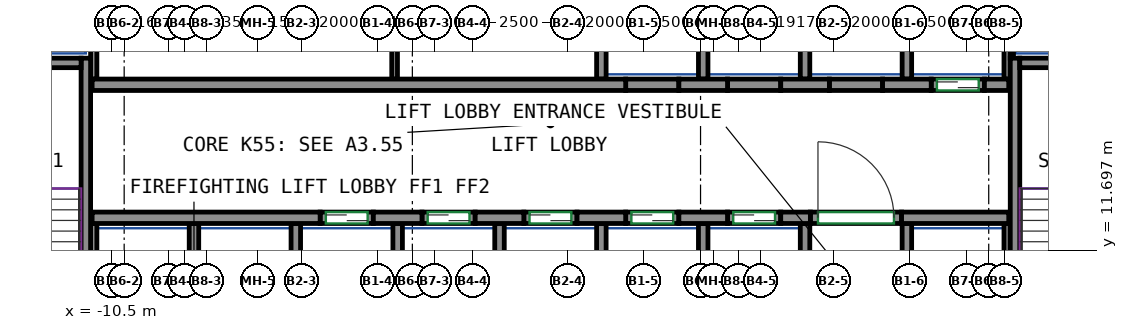
"""IFC4 building model, lengths in metres.
Left out: names, types, materials, properties, quantities, classifications, styles, units other than length and angle.
Written with IfcOpenShell. Run it as: python <this file> out.ifc"""

import sys

from ifc_helpers import new_model, si_unit, direction, frame, frame_2d, origin, place, context, subcontext, project, spatial, rectangle, extrude, source, transform, mapped, element, fill, save


model = new_model("IFC4")
c1 = context("Model", 3, precision=1e-05, world=origin(), true_north=direction((0.0, 1.0)))
c2 = subcontext(c1, "Body", "Model", "MODEL_VIEW")
j1 = project(units=[si_unit("LENGTHUNIT", "METRE"), si_unit("PLANEANGLEUNIT", "RADIAN")], contexts=[c1])
p1 = place(None, origin())
s1 = spatial("IfcSite", under=j1, at=p1, CompositionType="ELEMENT")
p2 = place(p1, origin())
s2 = spatial("IfcBuilding", under=s1, at=p2, CompositionType="ELEMENT")
p3 = place(p2, frame((0.0, 0.0, 220.3)))
s3 = spatial("IfcBuildingStorey", under=s2, at=p3, CompositionType="ELEMENT", Elevation=220.3)
m1 = source(origin(), c2, "Body", "SweptSolid", [
    extrude(rectangle(XDim=7.75, YDim=0.25, at=frame_2d((3.875, 0.0))), origin(), (0.0, 0.0, 1.0), 3.0),
])
p4 = place(p3, frame((-11.175, 9.0, 0.0), z_axis=(0.0, 0.0, 1.0), x_axis=(0.0, 1.0, 0.0)))
e1 = element("IfcWall", 1, at=p4, inside=s3, PredefinedType="SHEAR", context=c2, shape_type="MappedRepresentation", body=[
    mapped(m1, transform((0.0, 0.0, 0.0))),
])
m2 = source(origin(), c2, "Body", "SweptSolid", [
    extrude(rectangle(XDim=3.7, YDim=0.25, at=frame_2d((1.85, 0.0))), origin(), (0.0, 0.0, 1.0), 3.0),
])
p5 = place(p3, frame((-15.0, 16.625, 0.0), z_axis=(0.0, 0.0, 1.0), x_axis=(1.0, 0.0, 0.0)))
e2 = element("IfcWall", 2, at=p5, inside=s3, PredefinedType="SHEAR", context=c2, shape_type="MappedRepresentation", body=[
    mapped(m2, transform((0.0, 0.0, 0.0))),
])
p6 = place(p3, frame((13.275, 9.0, 0.0), z_axis=(0.0, 0.0, 1.0), x_axis=(0.0, 1.0, 0.0)))
e3 = element("IfcWall", 3, at=p6, inside=s3, PredefinedType="SHEAR", context=c2, shape_type="MappedRepresentation", body=[
    mapped(m1, transform((0.0, 0.0, 0.0))),
])
m3 = source(origin(), c2, "Body", "SweptSolid", [
    extrude(rectangle(XDim=3.7, YDim=0.25, at=frame_2d((1.85, 0.0))), origin(), (0.0, 0.0, 1.0), 3.0),
])
p7 = place(p3, frame((13.4, 16.625, 0.0), z_axis=(0.0, 0.0, 1.0), x_axis=(1.0, 0.0, 0.0)))
e4 = element("IfcWall", 4, at=p7, inside=s3, PredefinedType="SHEAR", context=c2, shape_type="MappedRepresentation", body=[
    mapped(m3, transform((0.0, 0.0, 0.0))),
])
m4 = source(origin(), c2, "Body", "SweptSolid", [
    extrude(rectangle(XDim=6.0, YDim=0.3, at=frame_2d((3.0, 0.0))), origin(), (0.0, 0.0, 1.0), 3.0),
])
p8 = place(p3, frame((-11.01, 12.55, 0.0), z_axis=(0.0, 0.0, 1.0), x_axis=(1.0, 0.0, 0.0)))
e5 = element("IfcWall", 5, at=p8, inside=s3, PredefinedType="SHEAR", context=c2, shape_type="MappedRepresentation", body=[
    mapped(m4, transform((0.0, 0.0, 0.0))),
])
m5 = source(origin(), c2, "Body", "SweptSolid", [
    extrude(rectangle(XDim=1.28, YDim=0.3, at=frame_2d((0.64, 0.0))), origin(), (0.0, 0.0, 1.0), 3.0),
])
for number, where, z_axis, x_axis in (
    (6, (-3.61, 12.55, 0.0), (0.0, 0.0, 1.0), (1.0, 0.0, 0.0)),
    (7, (-0.93, 12.55, 0.0), (0.0, 0.0, 1.0), (1.0, 0.0, 0.0)),
    (8, (1.75, 12.55, 0.0), (0.0, 0.0, 1.0), (1.0, 0.0, 0.0)),
    (9, (4.43, 12.55, 0.0), (0.0, 0.0, 1.0), (1.0, 0.0, 0.0)),
):
    element("IfcWall", number, at=place(p3, frame(where, z_axis=z_axis, x_axis=x_axis)), inside=s3, PredefinedType="SHEAR", context=c2, shape_type="MappedRepresentation", body=[
        mapped(m5, transform((0.0, 0.0, 0.0))),
    ])
m6 = source(origin(), c2, "Body", "SweptSolid", [
    extrude(rectangle(XDim=0.78, YDim=0.3, at=frame_2d((0.39, 0.0))), origin(), (0.0, 0.0, 1.0), 3.0),
])
p9 = place(p3, frame((7.11, 12.55, 0.0), z_axis=(0.0, 0.0, 1.0), x_axis=(1.0, 0.0, 0.0)))
e10 = element("IfcWall", 10, at=p9, inside=s3, PredefinedType="SHEAR", context=c2, shape_type="MappedRepresentation", body=[
    mapped(m6, transform((0.0, 0.0, 0.0))),
])
m7 = source(origin(), c2, "Body", "SweptSolid", [
    extrude(rectangle(XDim=2.82, YDim=0.3, at=frame_2d((1.41, 0.0))), origin(), (0.0, 0.0, 1.0), 3.0),
])
p10 = place(p3, frame((10.29, 12.55, 0.0), z_axis=(0.0, 0.0, 1.0), x_axis=(1.0, 0.0, 0.0)))
e11 = element("IfcWall", 11, at=p10, inside=s3, PredefinedType="SHEAR", context=c2, shape_type="MappedRepresentation", body=[
    mapped(m7, transform((0.0, 0.0, 0.0))),
])
m8 = source(origin(), c2, "Body", "SweptSolid", [
    extrude(rectangle(XDim=14.04, YDim=0.3, at=frame_2d((7.02, 0.0))), origin(), (0.0, 0.0, 1.0), 3.0),
])
p11 = place(p3, frame((-11.01, 16.05, 0.0), z_axis=(0.0, 0.0, 1.0), x_axis=(1.0, 0.0, 0.0)))
e12 = element("IfcWall", 12, at=p11, inside=s3, PredefinedType="SHEAR", context=c2, shape_type="MappedRepresentation", body=[
    mapped(m8, transform((0.0, 0.0, 0.0))),
])
p12 = place(p3, frame((4.43, 16.05, 0.0), z_axis=(0.0, 0.0, 1.0), x_axis=(1.0, 0.0, 0.0)))
e13 = element("IfcWall", 13, at=p12, inside=s3, PredefinedType="SHEAR", context=c2, shape_type="MappedRepresentation", body=[
    mapped(m5, transform((0.0, 0.0, 0.0))),
])
m9 = source(origin(), c2, "Body", "SweptSolid", [
    extrude(rectangle(XDim=1.28, YDim=0.3, at=frame_2d((0.64, 0.0))), origin(), (0.0, 0.0, 1.0), 3.0),
])
p13 = place(p3, frame((7.11, 16.05, 0.0), z_axis=(0.0, 0.0, 1.0), x_axis=(1.0, 0.0, 0.0)))
e14 = element("IfcWall", 14, at=p13, inside=s3, PredefinedType="SHEAR", context=c2, shape_type="MappedRepresentation", body=[
    mapped(m9, transform((0.0, 0.0, 0.0))),
])
p14 = place(p3, frame((9.79, 16.05, 0.0), z_axis=(0.0, 0.0, 1.0), x_axis=(1.0, 0.0, 0.0)))
e15 = element("IfcWall", 15, at=p14, inside=s3, PredefinedType="SHEAR", context=c2, shape_type="MappedRepresentation", body=[
    mapped(m5, transform((0.0, 0.0, 0.0))),
])
m10 = source(origin(), c2, "Body", "SweptSolid", [
    extrude(rectangle(XDim=0.64, YDim=0.3, at=frame_2d((0.32, 0.0))), origin(), (0.0, 0.0, 1.0), 3.0),
])
p15 = place(p3, frame((12.47, 16.05, 0.0), z_axis=(0.0, 0.0, 1.0), x_axis=(1.0, 0.0, 0.0)))
e16 = element("IfcWall", 16, at=p15, inside=s3, PredefinedType="SHEAR", context=c2, shape_type="MappedRepresentation", body=[
    mapped(m10, transform((0.0, 0.0, 0.0))),
])
m11 = source(origin(), c2, "Body", "SweptSolid", [
    extrude(rectangle(XDim=1.4, YDim=0.3, at=frame_2d((0.7, 0.0))), origin(), (0.0, 0.0, 1.0), 3.0),
])
p16 = place(p3, frame((-5.01, 12.55, 0.0), z_axis=(0.0, 0.0, 1.0), x_axis=(1.0, 0.0, 0.0)))
e17 = element("IfcWall", 17, at=p16, inside=s3, PredefinedType="PARTITIONING", context=c2, shape_type="MappedRepresentation", body=[
    mapped(m11, transform((0.0, 0.0, 0.0))),
])
p17 = place(p16, frame((0.15, 0.0, 0.0)))
e18 = element("IfcOpeningElement", 18, at=p17, cuts=e17, PredefinedType="OPENING", context=c2, shape_type="SweptSolid", body=[
    extrude(rectangle(XDim=1.1, YDim=2.1, at=frame_2d((0.55, 1.05))), frame((0.0, 0.16, 0.0), z_axis=(0.0, -1.0, 0.0), x_axis=(1.0, 0.0, 0.0)), (0.0, 0.0, 1.0), 0.32),
])
m12 = source(origin(), c2, "Body", "SweptSolid", [
    extrude(rectangle(XDim=1.4, YDim=0.3, at=frame_2d((0.7, 0.0))), origin(), (0.0, 0.0, 1.0), 3.0),
])
p18 = place(p3, frame((-2.33, 12.55, 0.0), z_axis=(0.0, 0.0, 1.0), x_axis=(1.0, 0.0, 0.0)))
e19 = element("IfcWall", 19, at=p18, inside=s3, PredefinedType="PARTITIONING", context=c2, shape_type="MappedRepresentation", body=[
    mapped(m12, transform((0.0, 0.0, 0.0))),
])
p19 = place(p18, frame((0.15, 0.0, 0.0)))
e20 = element("IfcOpeningElement", 20, at=p19, cuts=e19, PredefinedType="OPENING", context=c2, shape_type="SweptSolid", body=[
    extrude(rectangle(XDim=1.1, YDim=2.1, at=frame_2d((0.55, 1.05))), frame((0.0, 0.16, 0.0), z_axis=(0.0, -1.0, 0.0), x_axis=(1.0, 0.0, 0.0)), (0.0, 0.0, 1.0), 0.32),
])
p20 = place(p3, frame((0.35, 12.55, 0.0), z_axis=(0.0, 0.0, 1.0), x_axis=(1.0, 0.0, 0.0)))
e21 = element("IfcWall", 21, at=p20, inside=s3, PredefinedType="PARTITIONING", context=c2, shape_type="MappedRepresentation", body=[
    mapped(m11, transform((0.0, 0.0, 0.0))),
])
p21 = place(p20, frame((0.15, 0.0, 0.0)))
e22 = element("IfcOpeningElement", 22, at=p21, cuts=e21, PredefinedType="OPENING", context=c2, shape_type="SweptSolid", body=[
    extrude(rectangle(XDim=1.1, YDim=2.1, at=frame_2d((0.55, 1.05))), frame((0.0, 0.16, 0.0), z_axis=(0.0, -1.0, 0.0), x_axis=(1.0, 0.0, 0.0)), (0.0, 0.0, 1.0), 0.32),
])
p22 = place(p3, frame((3.03, 12.55, 0.0), z_axis=(0.0, 0.0, 1.0), x_axis=(1.0, 0.0, 0.0)))
e23 = element("IfcWall", 23, at=p22, inside=s3, PredefinedType="PARTITIONING", context=c2, shape_type="MappedRepresentation", body=[
    mapped(m11, transform((0.0, 0.0, 0.0))),
])
p23 = place(p22, frame((0.15, 0.0, 0.0)))
e24 = element("IfcOpeningElement", 24, at=p23, cuts=e23, PredefinedType="OPENING", context=c2, shape_type="SweptSolid", body=[
    extrude(rectangle(XDim=1.1, YDim=2.1, at=frame_2d((0.55, 1.05))), frame((0.0, 0.16, 0.0), z_axis=(0.0, -1.0, 0.0), x_axis=(1.0, 0.0, 0.0)), (0.0, 0.0, 1.0), 0.32),
])
p24 = place(p3, frame((5.71, 12.55, 0.0), z_axis=(0.0, 0.0, 1.0), x_axis=(1.0, 0.0, 0.0)))
e25 = element("IfcWall", 25, at=p24, inside=s3, PredefinedType="PARTITIONING", context=c2, shape_type="MappedRepresentation", body=[
    mapped(m12, transform((0.0, 0.0, 0.0))),
])
p25 = place(p24, frame((0.15, 0.0, 0.0)))
e26 = element("IfcOpeningElement", 26, at=p25, cuts=e25, PredefinedType="OPENING", context=c2, shape_type="SweptSolid", body=[
    extrude(rectangle(XDim=1.1, YDim=2.1, at=frame_2d((0.55, 1.05))), frame((0.0, 0.16, 0.0), z_axis=(0.0, -1.0, 0.0), x_axis=(1.0, 0.0, 0.0)), (0.0, 0.0, 1.0), 0.32),
])
p26 = place(p3, frame((11.07, 16.05, 0.0), z_axis=(0.0, 0.0, 1.0), x_axis=(1.0, 0.0, 0.0)))
e27 = element("IfcWall", 27, at=p26, inside=s3, PredefinedType="PARTITIONING", context=c2, shape_type="MappedRepresentation", body=[
    mapped(m11, transform((0.0, 0.0, 0.0))),
])
p27 = place(p26, frame((0.15, 0.0, 0.0)))
e28 = element("IfcOpeningElement", 28, at=p27, cuts=e27, PredefinedType="OPENING", context=c2, shape_type="SweptSolid", body=[
    extrude(rectangle(XDim=1.1, YDim=2.1, at=frame_2d((0.55, 1.05))), frame((0.0, 0.16, 0.0), z_axis=(0.0, -1.0, 0.0), x_axis=(1.0, 0.0, 0.0)), (0.0, 0.0, 1.0), 0.32),
])
m13 = source(origin(), c2, "Body", "SweptSolid", [
    extrude(rectangle(XDim=2.4, YDim=0.3, at=frame_2d((1.2, 0.0))), origin(), (0.0, 0.0, 1.0), 3.0),
])
p28 = place(p3, frame((7.89, 12.55, 0.0), z_axis=(0.0, 0.0, 1.0), x_axis=(1.0, 0.0, 0.0)))
e29 = element("IfcWall", 29, at=p28, inside=s3, PredefinedType="PARTITIONING", context=c2, shape_type="MappedRepresentation", body=[
    mapped(m13, transform((0.0, 0.0, 0.0))),
])
p29 = place(p28, frame((0.2, 0.0, 0.0)))
e30 = element("IfcOpeningElement", 30, at=p29, cuts=e29, PredefinedType="OPENING", context=c2, shape_type="SweptSolid", body=[
    extrude(rectangle(XDim=2.0, YDim=2.1, at=frame_2d((1.0, 1.05))), frame((0.0, 0.16, 0.0), z_axis=(0.0, -1.0, 0.0), x_axis=(1.0, 0.0, 0.0)), (0.0, 0.0, 1.0), 0.32),
])
p30 = place(p3, frame((3.03, 16.05, 0.0), z_axis=(0.0, 0.0, 1.0), x_axis=(1.0, 0.0, 0.0)))
e31 = element("IfcWall", 31, at=p30, inside=s3, PredefinedType="PARTITIONING", context=c2, shape_type="MappedRepresentation", body=[
    mapped(m11, transform((0.0, 0.0, 0.0))),
])
for number, where, z_axis, x_axis in (
    (32, (5.71, 16.05, 0.0), (0.0, 0.0, 1.0), (1.0, 0.0, 0.0)),
    (33, (8.39, 16.05, 0.0), (0.0, 0.0, 1.0), (1.0, 0.0, 0.0)),
):
    element("IfcWall", number, at=place(p3, frame(where, z_axis=z_axis, x_axis=x_axis)), inside=s3, PredefinedType="PARTITIONING", context=c2, shape_type="MappedRepresentation", body=[
        mapped(m12, transform((0.0, 0.0, 0.0))),
    ])
m14 = source(origin(), c2, "Body", "SweptSolid", [
    extrude(rectangle(XDim=3.275, YDim=0.165, at=frame_2d((1.638, 0.0))), origin(), (0.0, 0.0, 1.0), 3.0),
])
p31 = place(p3, frame((13.067, 16.2, 0.0), z_axis=(0.0, 0.0, 1.0), x_axis=(0.0, 1.0, 0.0)))
e34 = element("IfcWall", 34, at=p31, inside=s3, PredefinedType="PARTITIONING", context=c2, shape_type="MappedRepresentation", body=[
    mapped(m14, transform((0.0, 0.0, 0.0))),
])
m15 = source(origin(), c2, "Body", "SweptSolid", [
    extrude(rectangle(XDim=4.8, YDim=0.165, at=frame_2d((2.4, 0.0))), origin(), (0.0, 0.0, 1.0), 3.0),
])
p32 = place(p3, frame((-10.968, 16.2, 0.0), z_axis=(0.0, 0.0, 1.0), x_axis=(0.0, 1.0, 0.0)))
e35 = element("IfcWall", 35, at=p32, inside=s3, PredefinedType="PARTITIONING", context=c2, shape_type="MappedRepresentation", body=[
    mapped(m15, transform((0.0, 0.0, 0.0))),
])
m16 = source(origin(), c2, "Body", "SweptSolid", [
    extrude(rectangle(XDim=3.275, YDim=0.25, at=frame_2d((1.638, 0.0))), origin(), (0.0, 0.0, 1.0), 3.0),
])
p33 = place(p3, frame((10.43, 16.2, 0.0), z_axis=(0.0, 0.0, 1.0), x_axis=(0.0, 1.0, 0.0)))
e36 = element("IfcWall", 36, at=p33, inside=s3, PredefinedType="PARTITIONING", context=c2, shape_type="MappedRepresentation", body=[
    mapped(m16, transform((0.0, 0.0, 0.0))),
])
m17 = source(origin(), c2, "Body", "SweptSolid", [
    extrude(rectangle(XDim=2.725, YDim=0.085, at=frame_2d((1.363, 0.0))), origin(), (0.0, 0.0, 1.0), 3.0),
])
p34 = place(p3, frame((13.192, 16.75, 0.0), z_axis=(0.0, 0.0, 1.0), x_axis=(0.0, 1.0, 0.0)))
e37 = element("IfcWall", 37, at=p34, inside=s3, PredefinedType="PARTITIONING", context=c2, shape_type="MappedRepresentation", body=[
    mapped(m17, transform((0.0, 0.0, 0.0))),
])
for number, where, z_axis, x_axis in (
    (38, (2.39, 16.2, 0.0), (0.0, 0.0, 1.0), (0.0, 1.0, 0.0)),
    (39, (5.07, 16.2, 0.0), (0.0, 0.0, 1.0), (0.0, 1.0, 0.0)),
    (40, (7.75, 16.2, 0.0), (0.0, 0.0, 1.0), (0.0, 1.0, 0.0)),
):
    element("IfcWall", number, at=place(p3, frame(where, z_axis=z_axis, x_axis=x_axis)), inside=s3, PredefinedType="PARTITIONING", context=c2, shape_type="MappedRepresentation", body=[
        mapped(m16, transform((0.0, 0.0, 0.0))),
    ])
m18 = source(origin(), c2, "Body", "SweptSolid", [
    extrude(rectangle(XDim=3.4, YDim=0.25, at=frame_2d((1.7, 0.0))), origin(), (0.0, 0.0, 1.0), 3.0),
])
p35 = place(p3, frame((10.43, 9.0, 0.0), z_axis=(0.0, 0.0, 1.0), x_axis=(0.0, 1.0, 0.0)))
e41 = element("IfcWall", 41, at=p35, inside=s3, PredefinedType="PARTITIONING", context=c2, shape_type="MappedRepresentation", body=[
    mapped(m18, transform((0.0, 0.0, 0.0))),
])
m19 = source(origin(), c2, "Body", "SweptSolid", [
    extrude(rectangle(XDim=3.4, YDim=0.165, at=frame_2d((1.7, 0.0))), origin(), (0.0, 0.0, 1.0), 3.0),
])
p36 = place(p3, frame((13.067, 9.0, 0.0), z_axis=(0.0, 0.0, 1.0), x_axis=(0.0, 1.0, 0.0)))
e42 = element("IfcWall", 42, at=p36, inside=s3, PredefinedType="PARTITIONING", context=c2, shape_type="MappedRepresentation", body=[
    mapped(m19, transform((0.0, 0.0, 0.0))),
])
for number, where, z_axis, x_axis in (
    (43, (2.39, 9.0, 0.0), (0.0, 0.0, 1.0), (0.0, 1.0, 0.0)),
    (44, (5.07, 9.0, 0.0), (0.0, 0.0, 1.0), (0.0, 1.0, 0.0)),
    (45, (7.75, 9.0, 0.0), (0.0, 0.0, 1.0), (0.0, 1.0, 0.0)),
    (46, (-0.29, 9.0, 0.0), (0.0, 0.0, 1.0), (0.0, 1.0, 0.0)),
):
    element("IfcWall", number, at=place(p3, frame(where, z_axis=z_axis, x_axis=x_axis)), inside=s3, PredefinedType="PARTITIONING", context=c2, shape_type="MappedRepresentation", body=[
        mapped(m18, transform((0.0, 0.0, 0.0))),
    ])
p37 = place(p3, frame((-10.968, 9.0, 0.0), z_axis=(0.0, 0.0, 1.0), x_axis=(0.0, 1.0, 0.0)))
e47 = element("IfcWall", 47, at=p37, inside=s3, PredefinedType="PARTITIONING", context=c2, shape_type="MappedRepresentation", body=[
    mapped(m19, transform((0.0, 0.0, 0.0))),
])
for number, where, z_axis, x_axis in (
    (48, (-2.97, 9.0, 0.0), (0.0, 0.0, 1.0), (0.0, 1.0, 0.0)),
    (49, (-5.65, 9.0, 0.0), (0.0, 0.0, 1.0), (0.0, 1.0, 0.0)),
    (50, (-8.33, 9.0, 0.0), (0.0, 0.0, 1.0), (0.0, 1.0, 0.0)),
):
    element("IfcWall", number, at=place(p3, frame(where, z_axis=z_axis, x_axis=x_axis)), inside=s3, PredefinedType="PARTITIONING", context=c2, shape_type="MappedRepresentation", body=[
        mapped(m18, transform((0.0, 0.0, 0.0))),
    ])
m20 = source(origin(), c2, "Body", "SweptSolid", [
    extrude(rectangle(XDim=4.8, YDim=0.15, at=frame_2d((2.4, 0.0))), origin(), (0.0, 0.0, 1.0), 3.0),
])
p38 = place(p3, frame((-3.05, 16.2, 0.0), z_axis=(0.0, 0.0, 1.0), x_axis=(0.0, 1.0, 0.0)))
e51 = element("IfcWall", 51, at=p38, inside=s3, PredefinedType="PARTITIONING", context=c2, shape_type="MappedRepresentation", body=[
    mapped(m20, transform((0.0, 0.0, 0.0))),
])
p39 = place(p29, origin())
e52 = element("IfcDoor", 52, at=p39, inside=s3, OperationType="DOUBLE_DOOR_SINGLE_SWING", PredefinedType="DOOR", context=c2, shape_type="SweptSolid", body=[
    extrude(rectangle(XDim=2.0, YDim=2.1, at=frame_2d((1.0, 1.05))), frame((0.0, 0.025, 0.0), z_axis=(0.0, -1.0, 0.0), x_axis=(1.0, 0.0, 0.0)), (0.0, 0.0, 1.0), 0.05),
])
fill(e30, e52)
p40 = place(p17, origin())
e53 = element("IfcDoor", 53, at=p40, inside=s3, OperationType="DOUBLE_DOOR_SLIDING", PredefinedType="DOOR", context=c2, shape_type="SweptSolid", body=[
    extrude(rectangle(XDim=1.1, YDim=2.1, at=frame_2d((0.55, 1.05))), frame((0.0, 0.025, 0.0), z_axis=(0.0, -1.0, 0.0), x_axis=(1.0, 0.0, 0.0)), (0.0, 0.0, 1.0), 0.05),
])
fill(e18, e53)
p41 = place(p19, origin())
e54 = element("IfcDoor", 54, at=p41, inside=s3, OperationType="DOUBLE_DOOR_SLIDING", PredefinedType="DOOR", context=c2, shape_type="SweptSolid", body=[
    extrude(rectangle(XDim=1.1, YDim=2.1, at=frame_2d((0.55, 1.05))), frame((0.0, 0.025, 0.0), z_axis=(0.0, -1.0, 0.0), x_axis=(1.0, 0.0, 0.0)), (0.0, 0.0, 1.0), 0.05),
])
fill(e20, e54)
p42 = place(p21, origin())
e55 = element("IfcDoor", 55, at=p42, inside=s3, OperationType="DOUBLE_DOOR_SLIDING", PredefinedType="DOOR", context=c2, shape_type="SweptSolid", body=[
    extrude(rectangle(XDim=1.1, YDim=2.1, at=frame_2d((0.55, 1.05))), frame((0.0, 0.025, 0.0), z_axis=(0.0, -1.0, 0.0), x_axis=(1.0, 0.0, 0.0)), (0.0, 0.0, 1.0), 0.05),
])
fill(e22, e55)
p43 = place(p23, origin())
e56 = element("IfcDoor", 56, at=p43, inside=s3, OperationType="DOUBLE_DOOR_SLIDING", PredefinedType="DOOR", context=c2, shape_type="SweptSolid", body=[
    extrude(rectangle(XDim=1.1, YDim=2.1, at=frame_2d((0.55, 1.05))), frame((0.0, 0.025, 0.0), z_axis=(0.0, -1.0, 0.0), x_axis=(1.0, 0.0, 0.0)), (0.0, 0.0, 1.0), 0.05),
])
fill(e24, e56)
p44 = place(p25, origin())
e57 = element("IfcDoor", 57, at=p44, inside=s3, OperationType="DOUBLE_DOOR_SLIDING", PredefinedType="DOOR", context=c2, shape_type="SweptSolid", body=[
    extrude(rectangle(XDim=1.1, YDim=2.1, at=frame_2d((0.55, 1.05))), frame((0.0, 0.025, 0.0), z_axis=(0.0, -1.0, 0.0), x_axis=(1.0, 0.0, 0.0)), (0.0, 0.0, 1.0), 0.05),
])
fill(e26, e57)
p45 = place(p27, origin())
e58 = element("IfcDoor", 58, at=p45, inside=s3, OperationType="DOUBLE_DOOR_SLIDING", PredefinedType="DOOR", context=c2, shape_type="SweptSolid", body=[
    extrude(rectangle(XDim=1.1, YDim=2.1, at=frame_2d((0.55, 1.05))), frame((0.0, 0.025, 0.0), z_axis=(0.0, -1.0, 0.0), x_axis=(1.0, 0.0, 0.0)), (0.0, 0.0, 1.0), 0.05),
])
fill(e28, e58)
save(model, sys.argv[1])
